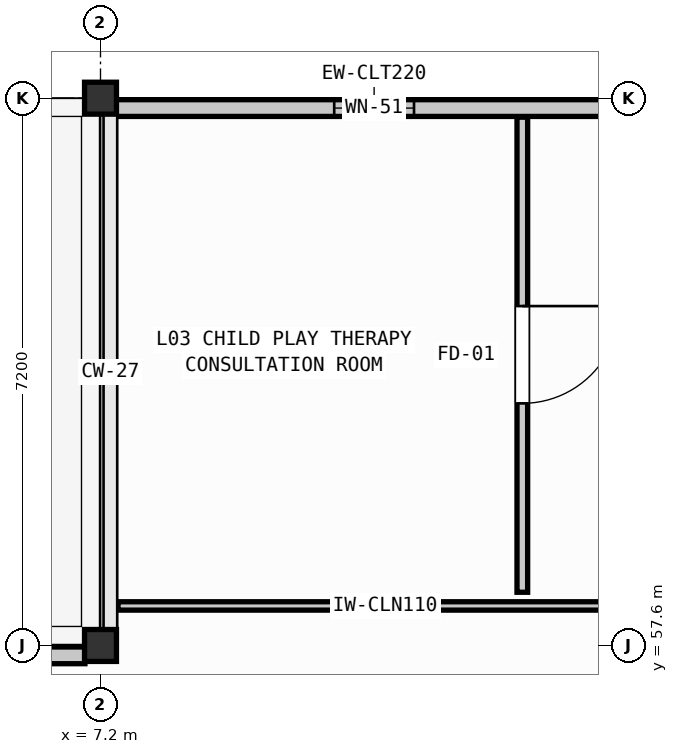
"""IFC4 building model, lengths in metres.
Left out: names, types, materials, properties, quantities, classifications, styles, units other than length and angle.
Written with IfcOpenShell. Run it as: python <this file> out.ifc"""

import sys

from ifc_helpers import new_model, si_unit, direction, frame, frame_2d, origin, origin_2d, place, context, subcontext, project, spatial, rectangle, extrude, element, fill, save


model = new_model("IFC4")
c1 = context("Model", 3, precision=1e-05, world=origin(), true_north=direction((0.0, 1.0)))
c2 = subcontext(c1, "Body", "Model", "MODEL_VIEW")
j1 = project(units=[si_unit("LENGTHUNIT", "METRE"), si_unit("PLANEANGLEUNIT", "RADIAN")], contexts=[c1])
p1 = place(None, origin())
s1 = spatial("IfcSite", under=j1, at=p1, CompositionType="ELEMENT")
p2 = place(p1, origin())
s2 = spatial("IfcBuilding", under=s1, at=p2, CompositionType="ELEMENT")
p3 = place(p2, frame((0.0, 0.0, 9.3)))
s3 = spatial("IfcBuildingStorey", under=s2, at=p3, CompositionType="ELEMENT", Elevation=9.3)
for number, where, z_axis, x_axis in (
    (1, (7.2, 57.6, 0.0), (0.0, 0.0, 1.0), (1.0, 0.0, 0.0)),
    (2, (7.2, 64.8, 0.0), (0.0, 0.0, 1.0), (1.0, 0.0, 0.0)),
):
    element("IfcColumn", number, at=place(p3, frame(where, z_axis=z_axis, x_axis=x_axis)), inside=s3, PredefinedType="COLUMN", context=c2, shape_type="SweptSolid", body=[
        extrude(rectangle(XDim=0.42, YDim=0.42, at=origin_2d()), origin(), (0.0, 0.0, 1.0), 3.99),
    ])
p4 = place(p3, frame((7.405, 64.67, 0.0), z_axis=(0.0, 0.0, 1.0), x_axis=(1.0, 0.0, 0.0)))
e3 = element("IfcWall", 3, at=p4, inside=s3, PredefinedType="SOLIDWALL", context=c2, shape_type="SweptSolid", body=[
    extrude(rectangle(XDim=6.79, YDim=0.22, at=frame_2d((3.395, 0.0))), origin(), (0.0, 0.0, 1.0), 3.27),
])
p5 = place(p4, frame((2.87, 0.0, 0.95)))
e4 = element("IfcOpeningElement", 4, at=p5, cuts=e3, PredefinedType="OPENING", context=c2, shape_type="SweptSolid", body=[
    extrude(rectangle(XDim=1.05, YDim=1.85, at=frame_2d((0.525, 0.925))), frame((0.0, 0.12, 0.0), z_axis=(0.0, -1.0, 0.0), x_axis=(1.0, 0.0, 0.0)), (0.0, 0.0, 1.0), 0.24),
])
p6 = place(p3, frame((0.205, 57.47, 0.0), z_axis=(0.0, 0.0, 1.0), x_axis=(1.0, 0.0, 0.0)))
e5 = element("IfcWall", 5, at=p6, inside=s3, PredefinedType="SOLIDWALL", context=c2, shape_type="SweptSolid", body=[
    extrude(rectangle(XDim=6.79, YDim=0.22, at=frame_2d((3.395, 0.0))), origin(), (0.0, 0.0, 1.0), 3.27),
])
p7 = place(p6, frame((2.345, 0.0, 0.95)))
e6 = element("IfcOpeningElement", 6, at=p7, cuts=e5, PredefinedType="OPENING", context=c2, shape_type="SweptSolid", body=[
    extrude(rectangle(XDim=2.1, YDim=1.85, at=frame_2d((1.05, 0.925))), frame((0.0, 0.12, 0.0), z_axis=(0.0, -1.0, 0.0), x_axis=(1.0, 0.0, 0.0)), (0.0, 0.0, 1.0), 0.24),
])
p8 = place(p3, frame((7.43, 58.12, 0.0), z_axis=(0.0, 0.0, 1.0), x_axis=(1.0, 0.0, 0.0)))
e7 = element("IfcWall", 7, at=p8, inside=s3, PredefinedType="PARTITIONING", context=c2, shape_type="SweptSolid", body=[
    extrude(rectangle(XDim=7.03, YDim=0.11, at=frame_2d((3.515, 0.0))), origin(), (0.0, 0.0, 1.0), 3.35),
])
p9 = place(p3, frame((12.75, 64.55, 0.0), z_axis=(0.0, 0.0, 1.0), x_axis=(0.0, -1.0, 0.0)))
e8 = element("IfcWall", 8, at=p9, inside=s3, PredefinedType="PARTITIONING", context=c2, shape_type="SweptSolid", body=[
    extrude(rectangle(XDim=6.25, YDim=0.14, at=frame_2d((3.125, 0.0))), origin(), (0.0, 0.0, 1.0), 3.27),
])
p10 = place(p9, frame((2.485, 0.0, 0.0)))
e9 = element("IfcOpeningElement", 9, at=p10, cuts=e8, PredefinedType="OPENING", context=c2, shape_type="SweptSolid", body=[
    extrude(rectangle(XDim=1.28, YDim=2.18, at=frame_2d((0.64, 1.09))), frame((0.0, 0.08, 0.0), z_axis=(0.0, -1.0, 0.0), x_axis=(1.0, 0.0, 0.0)), (0.0, 0.0, 1.0), 0.16),
])
p11 = place(p5, origin())
e10 = element("IfcWindow", 10, at=p11, inside=s3, PartitioningType="SINGLE_PANEL", PredefinedType="WINDOW", context=c2, shape_type="SweptSolid", body=[
    extrude(rectangle(XDim=1.05, YDim=1.85, at=frame_2d((0.525, 0.925))), frame((0.0, 0.03, 0.0), z_axis=(0.0, -1.0, 0.0), x_axis=(1.0, 0.0, 0.0)), (0.0, 0.0, 1.0), 0.06),
])
fill(e4, e10)
p12 = place(p10, origin())
e11 = element("IfcDoor", 11, at=p12, inside=s3, OperationType="SINGLE_SWING_RIGHT", PredefinedType="DOOR", context=c2, shape_type="SweptSolid", body=[
    extrude(rectangle(XDim=1.28, YDim=2.18, at=frame_2d((0.64, 1.09))), frame((0.0, 0.025, 0.0), z_axis=(0.0, -1.0, 0.0), x_axis=(1.0, 0.0, 0.0)), (0.0, 0.0, 1.0), 0.05),
])
fill(e9, e11)
save(model, sys.argv[1])
